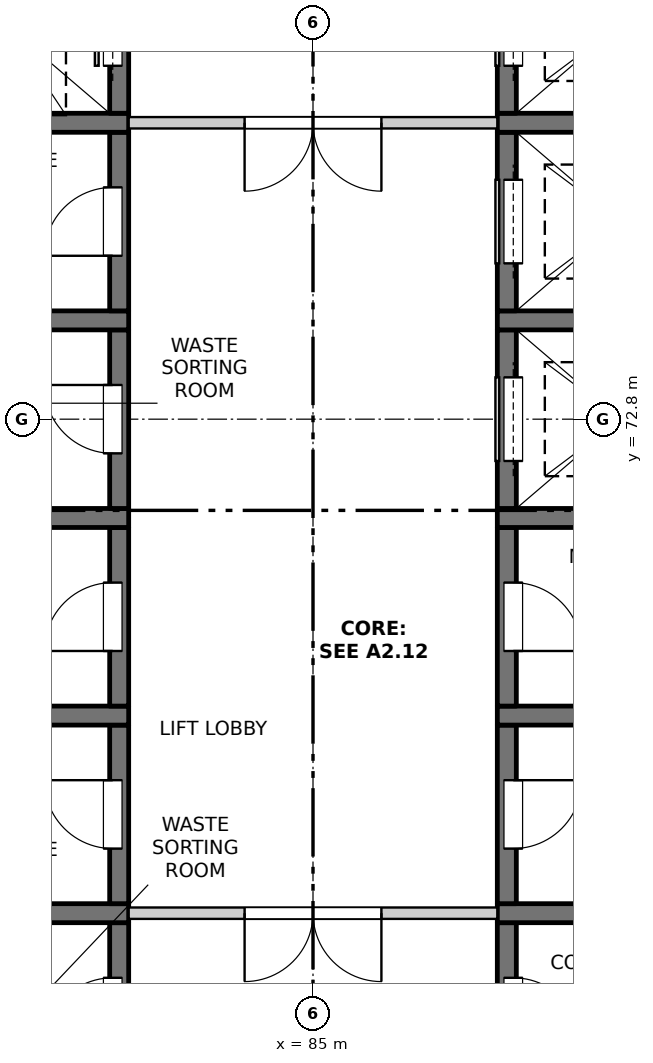
"""IFC4 building model, lengths in metres.
Left out: names, types, materials, properties, quantities, classifications, styles, units other than length and angle.
Written with IfcOpenShell. Run it as: python <this file> out.ifc"""

import sys

from ifc_helpers import new_model, si_unit, direction, frame, frame_2d, origin, place, context, subcontext, project, spatial, rectangle, extrude, element, fill, save


model = new_model("IFC4")
c1 = context("Model", 3, precision=1e-05, world=origin(), true_north=direction((0.0, 1.0)))
c2 = subcontext(c1, "Body", "Model", "MODEL_VIEW")
j1 = project(units=[si_unit("LENGTHUNIT", "METRE"), si_unit("PLANEANGLEUNIT", "RADIAN")], contexts=[c1])
p1 = place(None, origin())
s1 = spatial("IfcSite", under=j1, at=p1, CompositionType="ELEMENT")
p2 = place(p1, origin())
s2 = spatial("IfcBuilding", under=s1, at=p2, CompositionType="ELEMENT")
p3 = place(p2, frame((0.0, 0.0, 263.0)))
s3 = spatial("IfcBuildingStorey", under=s2, at=p3, CompositionType="ELEMENT", Elevation=263.0)
p4 = place(p3, frame((82.45, 63.825, -0.25), z_axis=(0.0, 0.0, 1.0), x_axis=(0.0, 1.0, 0.0)))
e1 = element("IfcWall", 1, at=p4, inside=s3, PredefinedType="SOLIDWALL", context=c2, shape_type="SweptSolid", body=[
    extrude(rectangle(XDim=2.35, YDim=0.25, at=frame_2d((1.175, 0.0))), origin(), (0.0, 0.0, 1.0), 3.35),
])
p5 = place(p4, frame((0.725, 0.0, 0.25)))
e2 = element("IfcOpeningElement", 2, at=p5, cuts=e1, PredefinedType="OPENING", context=c2, shape_type="SweptSolid", body=[
    extrude(rectangle(XDim=0.9, YDim=2.1, at=frame_2d((0.45, 1.05))), frame((0.0, 0.135, 0.0), z_axis=(0.0, -1.0, 0.0), x_axis=(1.0, 0.0, 0.0)), (0.0, 0.0, 1.0), 0.27),
])
p6 = place(p3, frame((79.575, 66.3, -0.25), z_axis=(0.0, 0.0, 1.0), x_axis=(1.0, 0.0, 0.0)))
e3 = element("IfcWall", 3, at=p6, inside=s3, PredefinedType="SOLIDWALL", context=c2, shape_type="SweptSolid", body=[
    extrude(rectangle(XDim=3.0, YDim=0.25, at=frame_2d((1.5, 0.0))), origin(), (0.0, 0.0, 1.0), 3.35),
])
p7 = place(p3, frame((82.45, 66.425, -0.25), z_axis=(0.0, 0.0, 1.0), x_axis=(0.0, 1.0, 0.0)))
e4 = element("IfcWall", 4, at=p7, inside=s3, PredefinedType="SOLIDWALL", context=c2, shape_type="SweptSolid", body=[
    extrude(rectangle(XDim=2.35, YDim=0.25, at=frame_2d((1.175, 0.0))), origin(), (0.0, 0.0, 1.0), 3.35),
])
p8 = place(p7, frame((0.725, 0.0, 0.25)))
e5 = element("IfcOpeningElement", 5, at=p8, cuts=e4, PredefinedType="OPENING", context=c2, shape_type="SweptSolid", body=[
    extrude(rectangle(XDim=0.9, YDim=2.1, at=frame_2d((0.45, 1.05))), frame((0.0, 0.135, 0.0), z_axis=(0.0, -1.0, 0.0), x_axis=(1.0, 0.0, 0.0)), (0.0, 0.0, 1.0), 0.27),
])
p9 = place(p3, frame((79.575, 68.9, -0.25), z_axis=(0.0, 0.0, 1.0), x_axis=(1.0, 0.0, 0.0)))
e6 = element("IfcWall", 6, at=p9, inside=s3, PredefinedType="SOLIDWALL", context=c2, shape_type="SweptSolid", body=[
    extrude(rectangle(XDim=3.0, YDim=0.25, at=frame_2d((1.5, 0.0))), origin(), (0.0, 0.0, 1.0), 3.35),
])
p10 = place(p3, frame((82.45, 69.025, -0.25), z_axis=(0.0, 0.0, 1.0), x_axis=(0.0, 1.0, 0.0)))
e7 = element("IfcWall", 7, at=p10, inside=s3, PredefinedType="SOLIDWALL", context=c2, shape_type="SweptSolid", body=[
    extrude(rectangle(XDim=2.35, YDim=0.25, at=frame_2d((1.175, 0.0))), origin(), (0.0, 0.0, 1.0), 3.35),
])
p11 = place(p10, frame((0.725, 0.0, 0.25)))
e8 = element("IfcOpeningElement", 8, at=p11, cuts=e7, PredefinedType="OPENING", context=c2, shape_type="SweptSolid", body=[
    extrude(rectangle(XDim=0.9, YDim=2.1, at=frame_2d((0.45, 1.05))), frame((0.0, 0.135, 0.0), z_axis=(0.0, -1.0, 0.0), x_axis=(1.0, 0.0, 0.0)), (0.0, 0.0, 1.0), 0.27),
])
p12 = place(p3, frame((79.575, 71.5, -0.25), z_axis=(0.0, 0.0, 1.0), x_axis=(1.0, 0.0, 0.0)))
e9 = element("IfcWall", 9, at=p12, inside=s3, PredefinedType="SOLIDWALL", context=c2, shape_type="SweptSolid", body=[
    extrude(rectangle(XDim=3.0, YDim=0.25, at=frame_2d((1.5, 0.0))), origin(), (0.0, 0.0, 1.0), 3.35),
])
p13 = place(p3, frame((82.45, 71.625, -0.25), z_axis=(0.0, 0.0, 1.0), x_axis=(0.0, 1.0, 0.0)))
e10 = element("IfcWall", 10, at=p13, inside=s3, PredefinedType="SOLIDWALL", context=c2, shape_type="SweptSolid", body=[
    extrude(rectangle(XDim=2.35, YDim=0.25, at=frame_2d((1.175, 0.0))), origin(), (0.0, 0.0, 1.0), 3.35),
])
p14 = place(p13, frame((0.725, 0.0, 0.25)))
e11 = element("IfcOpeningElement", 11, at=p14, cuts=e10, PredefinedType="OPENING", context=c2, shape_type="SweptSolid", body=[
    extrude(rectangle(XDim=0.9, YDim=2.1, at=frame_2d((0.45, 1.05))), frame((0.0, 0.135, 0.0), z_axis=(0.0, -1.0, 0.0), x_axis=(1.0, 0.0, 0.0)), (0.0, 0.0, 1.0), 0.27),
])
p15 = place(p3, frame((79.575, 74.1, -0.25), z_axis=(0.0, 0.0, 1.0), x_axis=(1.0, 0.0, 0.0)))
e12 = element("IfcWall", 12, at=p15, inside=s3, PredefinedType="SOLIDWALL", context=c2, shape_type="SweptSolid", body=[
    extrude(rectangle(XDim=3.0, YDim=0.25, at=frame_2d((1.5, 0.0))), origin(), (0.0, 0.0, 1.0), 3.35),
])
p16 = place(p3, frame((82.45, 74.225, -0.25), z_axis=(0.0, 0.0, 1.0), x_axis=(0.0, 1.0, 0.0)))
e13 = element("IfcWall", 13, at=p16, inside=s3, PredefinedType="SOLIDWALL", context=c2, shape_type="SweptSolid", body=[
    extrude(rectangle(XDim=2.35, YDim=0.25, at=frame_2d((1.175, 0.0))), origin(), (0.0, 0.0, 1.0), 3.35),
])
p17 = place(p16, frame((0.725, 0.0, 0.25)))
e14 = element("IfcOpeningElement", 14, at=p17, cuts=e13, PredefinedType="OPENING", context=c2, shape_type="SweptSolid", body=[
    extrude(rectangle(XDim=0.9, YDim=2.1, at=frame_2d((0.45, 1.05))), frame((0.0, 0.135, 0.0), z_axis=(0.0, -1.0, 0.0), x_axis=(1.0, 0.0, 0.0)), (0.0, 0.0, 1.0), 0.27),
])
p18 = place(p3, frame((79.575, 76.7, -0.25), z_axis=(0.0, 0.0, 1.0), x_axis=(1.0, 0.0, 0.0)))
e15 = element("IfcWall", 15, at=p18, inside=s3, PredefinedType="SOLIDWALL", context=c2, shape_type="SweptSolid", body=[
    extrude(rectangle(XDim=3.0, YDim=0.25, at=frame_2d((1.5, 0.0))), origin(), (0.0, 0.0, 1.0), 3.35),
])
p19 = place(p3, frame((82.45, 76.825, -0.25), z_axis=(0.0, 0.0, 1.0), x_axis=(0.0, 1.0, 0.0)))
e16 = element("IfcWall", 16, at=p19, inside=s3, PredefinedType="SOLIDWALL", context=c2, shape_type="SweptSolid", body=[
    extrude(rectangle(XDim=2.35, YDim=0.25, at=frame_2d((1.175, 0.0))), origin(), (0.0, 0.0, 1.0), 3.35),
])
p20 = place(p19, frame((0.625, 0.0, 0.25)))
e17 = element("IfcOpeningElement", 17, at=p20, cuts=e16, PredefinedType="OPENING", context=c2, shape_type="SweptSolid", body=[
    extrude(rectangle(XDim=1.1, YDim=2.1, at=frame_2d((0.55, 1.05))), frame((0.0, 0.135, 0.0), z_axis=(0.0, -1.0, 0.0), x_axis=(1.0, 0.0, 0.0)), (0.0, 0.0, 1.0), 0.27),
])
p21 = place(p3, frame((87.55, 63.825, -0.25), z_axis=(0.0, 0.0, 1.0), x_axis=(0.0, 1.0, 0.0)))
e18 = element("IfcWall", 18, at=p21, inside=s3, PredefinedType="SOLIDWALL", context=c2, shape_type="SweptSolid", body=[
    extrude(rectangle(XDim=2.35, YDim=0.25, at=frame_2d((1.175, 0.0))), origin(), (0.0, 0.0, 1.0), 3.35),
])
p22 = place(p21, frame((0.725, 0.0, 0.25)))
e19 = element("IfcOpeningElement", 19, at=p22, cuts=e18, PredefinedType="OPENING", context=c2, shape_type="SweptSolid", body=[
    extrude(rectangle(XDim=0.9, YDim=2.1, at=frame_2d((0.45, 1.05))), frame((0.0, 0.135, 0.0), z_axis=(0.0, -1.0, 0.0), x_axis=(1.0, 0.0, 0.0)), (0.0, 0.0, 1.0), 0.27),
])
p23 = place(p3, frame((87.425, 66.3, -0.25), z_axis=(0.0, 0.0, 1.0), x_axis=(1.0, 0.0, 0.0)))
e20 = element("IfcWall", 20, at=p23, inside=s3, PredefinedType="SOLIDWALL", context=c2, shape_type="SweptSolid", body=[
    extrude(rectangle(XDim=3.0, YDim=0.25, at=frame_2d((1.5, 0.0))), origin(), (0.0, 0.0, 1.0), 3.35),
])
p24 = place(p3, frame((87.55, 66.425, -0.25), z_axis=(0.0, 0.0, 1.0), x_axis=(0.0, 1.0, 0.0)))
e21 = element("IfcWall", 21, at=p24, inside=s3, PredefinedType="SOLIDWALL", context=c2, shape_type="SweptSolid", body=[
    extrude(rectangle(XDim=2.35, YDim=0.25, at=frame_2d((1.175, 0.0))), origin(), (0.0, 0.0, 1.0), 3.35),
])
p25 = place(p24, frame((0.725, 0.0, 0.25)))
e22 = element("IfcOpeningElement", 22, at=p25, cuts=e21, PredefinedType="OPENING", context=c2, shape_type="SweptSolid", body=[
    extrude(rectangle(XDim=0.9, YDim=2.1, at=frame_2d((0.45, 1.05))), frame((0.0, 0.135, 0.0), z_axis=(0.0, -1.0, 0.0), x_axis=(1.0, 0.0, 0.0)), (0.0, 0.0, 1.0), 0.27),
])
p26 = place(p3, frame((87.425, 68.9, -0.25), z_axis=(0.0, 0.0, 1.0), x_axis=(1.0, 0.0, 0.0)))
e23 = element("IfcWall", 23, at=p26, inside=s3, PredefinedType="SOLIDWALL", context=c2, shape_type="SweptSolid", body=[
    extrude(rectangle(XDim=3.0, YDim=0.25, at=frame_2d((1.5, 0.0))), origin(), (0.0, 0.0, 1.0), 3.35),
])
p27 = place(p3, frame((87.55, 69.025, -0.25), z_axis=(0.0, 0.0, 1.0), x_axis=(0.0, 1.0, 0.0)))
e24 = element("IfcWall", 24, at=p27, inside=s3, PredefinedType="SOLIDWALL", context=c2, shape_type="SweptSolid", body=[
    extrude(rectangle(XDim=2.35, YDim=0.25, at=frame_2d((1.175, 0.0))), origin(), (0.0, 0.0, 1.0), 3.35),
])
p28 = place(p27, frame((0.725, 0.0, 0.25)))
e25 = element("IfcOpeningElement", 25, at=p28, cuts=e24, PredefinedType="OPENING", context=c2, shape_type="SweptSolid", body=[
    extrude(rectangle(XDim=0.9, YDim=2.1, at=frame_2d((0.45, 1.05))), frame((0.0, 0.135, 0.0), z_axis=(0.0, -1.0, 0.0), x_axis=(1.0, 0.0, 0.0)), (0.0, 0.0, 1.0), 0.27),
])
p29 = place(p3, frame((87.425, 71.5, -0.25), z_axis=(0.0, 0.0, 1.0), x_axis=(1.0, 0.0, 0.0)))
e26 = element("IfcWall", 26, at=p29, inside=s3, PredefinedType="SOLIDWALL", context=c2, shape_type="SweptSolid", body=[
    extrude(rectangle(XDim=3.0, YDim=0.25, at=frame_2d((1.5, 0.0))), origin(), (0.0, 0.0, 1.0), 3.35),
])
p30 = place(p3, frame((87.55, 71.625, -0.25), z_axis=(0.0, 0.0, 1.0), x_axis=(0.0, 1.0, 0.0)))
e27 = element("IfcWall", 27, at=p30, inside=s3, PredefinedType="SOLIDWALL", context=c2, shape_type="SweptSolid", body=[
    extrude(rectangle(XDim=2.35, YDim=0.25, at=frame_2d((1.175, 0.0))), origin(), (0.0, 0.0, 1.0), 3.35),
])
p31 = place(p30, frame((0.625, 0.0, 0.25)))
e28 = element("IfcOpeningElement", 28, at=p31, cuts=e27, PredefinedType="OPENING", context=c2, shape_type="SweptSolid", body=[
    extrude(rectangle(XDim=1.1, YDim=2.1, at=frame_2d((0.55, 1.05))), frame((0.0, 0.135, 0.0), z_axis=(0.0, -1.0, 0.0), x_axis=(1.0, 0.0, 0.0)), (0.0, 0.0, 1.0), 0.27),
])
p32 = place(p3, frame((87.425, 74.1, -0.25), z_axis=(0.0, 0.0, 1.0), x_axis=(1.0, 0.0, 0.0)))
e29 = element("IfcWall", 29, at=p32, inside=s3, PredefinedType="SOLIDWALL", context=c2, shape_type="SweptSolid", body=[
    extrude(rectangle(XDim=3.0, YDim=0.25, at=frame_2d((1.5, 0.0))), origin(), (0.0, 0.0, 1.0), 3.35),
])
p33 = place(p3, frame((87.55, 74.225, -0.25), z_axis=(0.0, 0.0, 1.0), x_axis=(0.0, 1.0, 0.0)))
e30 = element("IfcWall", 30, at=p33, inside=s3, PredefinedType="SOLIDWALL", context=c2, shape_type="SweptSolid", body=[
    extrude(rectangle(XDim=2.35, YDim=0.25, at=frame_2d((1.175, 0.0))), origin(), (0.0, 0.0, 1.0), 3.35),
])
p34 = place(p33, frame((0.625, 0.0, 0.25)))
e31 = element("IfcOpeningElement", 31, at=p34, cuts=e30, PredefinedType="OPENING", context=c2, shape_type="SweptSolid", body=[
    extrude(rectangle(XDim=1.1, YDim=2.1, at=frame_2d((0.55, 1.05))), frame((0.0, 0.135, 0.0), z_axis=(0.0, -1.0, 0.0), x_axis=(1.0, 0.0, 0.0)), (0.0, 0.0, 1.0), 0.27),
])
p35 = place(p3, frame((87.425, 76.7, -0.25), z_axis=(0.0, 0.0, 1.0), x_axis=(1.0, 0.0, 0.0)))
e32 = element("IfcWall", 32, at=p35, inside=s3, PredefinedType="SOLIDWALL", context=c2, shape_type="SweptSolid", body=[
    extrude(rectangle(XDim=3.0, YDim=0.25, at=frame_2d((1.5, 0.0))), origin(), (0.0, 0.0, 1.0), 3.35),
])
p36 = place(p3, frame((87.55, 76.825, -0.25), z_axis=(0.0, 0.0, 1.0), x_axis=(0.0, 1.0, 0.0)))
e33 = element("IfcWall", 33, at=p36, inside=s3, PredefinedType="SOLIDWALL", context=c2, shape_type="SweptSolid", body=[
    extrude(rectangle(XDim=2.35, YDim=0.25, at=frame_2d((1.175, 0.0))), origin(), (0.0, 0.0, 1.0), 3.35),
])
p37 = place(p36, frame((0.625, 0.0, 0.25)))
e34 = element("IfcOpeningElement", 34, at=p37, cuts=e33, PredefinedType="OPENING", context=c2, shape_type="SweptSolid", body=[
    extrude(rectangle(XDim=1.1, YDim=2.1, at=frame_2d((0.55, 1.05))), frame((0.0, 0.135, 0.0), z_axis=(0.0, -1.0, 0.0), x_axis=(1.0, 0.0, 0.0)), (0.0, 0.0, 1.0), 0.27),
])
p38 = place(p3, frame((82.575, 66.3, 0.0), z_axis=(0.0, 0.0, 1.0), x_axis=(1.0, 0.0, 0.0)))
e35 = element("IfcWall", 35, at=p38, inside=s3, PredefinedType="PARTITIONING", context=c2, shape_type="SweptSolid", body=[
    extrude(rectangle(XDim=4.85, YDim=0.15, at=frame_2d((2.425, 0.0))), origin(), (0.0, 0.0, 1.0), 3.1),
])
p39 = place(p38, frame((1.525, 0.0, 0.0)))
e36 = element("IfcOpeningElement", 36, at=p39, cuts=e35, PredefinedType="OPENING", context=c2, shape_type="SweptSolid", body=[
    extrude(rectangle(XDim=1.8, YDim=2.1, at=frame_2d((0.9, 1.05))), frame((0.0, 0.085, 0.0), z_axis=(0.0, -1.0, 0.0), x_axis=(1.0, 0.0, 0.0)), (0.0, 0.0, 1.0), 0.17),
])
p40 = place(p3, frame((82.575, 76.7, 0.0), z_axis=(0.0, 0.0, 1.0), x_axis=(1.0, 0.0, 0.0)))
e37 = element("IfcWall", 37, at=p40, inside=s3, PredefinedType="PARTITIONING", context=c2, shape_type="SweptSolid", body=[
    extrude(rectangle(XDim=4.85, YDim=0.15, at=frame_2d((2.425, 0.0))), origin(), (0.0, 0.0, 1.0), 3.1),
])
p41 = place(p40, frame((1.525, 0.0, 0.0)))
e38 = element("IfcOpeningElement", 38, at=p41, cuts=e37, PredefinedType="OPENING", context=c2, shape_type="SweptSolid", body=[
    extrude(rectangle(XDim=1.8, YDim=2.1, at=frame_2d((0.9, 1.05))), frame((0.0, 0.085, 0.0), z_axis=(0.0, -1.0, 0.0), x_axis=(1.0, 0.0, 0.0)), (0.0, 0.0, 1.0), 0.17),
])
p42 = place(p5, origin())
e39 = element("IfcDoor", 39, at=p42, inside=s3, OperationType="SINGLE_SWING_LEFT", PredefinedType="DOOR", context=c2, shape_type="SweptSolid", body=[
    extrude(rectangle(XDim=0.9, YDim=2.1, at=frame_2d((0.45, 1.05))), frame((0.0, 0.11, 0.0), z_axis=(0.0, -1.0, 0.0), x_axis=(1.0, 0.0, 0.0)), (0.0, 0.0, 1.0), 0.05),
])
fill(e2, e39)
p43 = place(p22, origin())
e40 = element("IfcDoor", 40, at=p43, inside=s3, OperationType="SINGLE_SWING_RIGHT", PredefinedType="DOOR", context=c2, shape_type="SweptSolid", body=[
    extrude(rectangle(XDim=0.9, YDim=2.1, at=frame_2d((0.45, 1.05))), frame((0.0, -0.06, 0.0), z_axis=(0.0, -1.0, 0.0), x_axis=(1.0, 0.0, 0.0)), (0.0, 0.0, 1.0), 0.05),
])
fill(e19, e40)
p44 = place(p39, origin())
e41 = element("IfcDoor", 41, at=p44, inside=s3, OperationType="DOUBLE_DOOR_SINGLE_SWING", PredefinedType="DOOR", context=c2, shape_type="SweptSolid", body=[
    extrude(rectangle(XDim=1.8, YDim=2.1, at=frame_2d((0.9, 1.05))), frame((0.0, 0.025, 0.0), z_axis=(0.0, -1.0, 0.0), x_axis=(1.0, 0.0, 0.0)), (0.0, 0.0, 1.0), 0.05),
])
fill(e36, e41)
p45 = place(p8, origin())
e42 = element("IfcDoor", 42, at=p45, inside=s3, OperationType="SINGLE_SWING_RIGHT", PredefinedType="DOOR", context=c2, shape_type="SweptSolid", body=[
    extrude(rectangle(XDim=0.9, YDim=2.1, at=frame_2d((0.45, 1.05))), frame((0.0, 0.11, 0.0), z_axis=(0.0, -1.0, 0.0), x_axis=(1.0, 0.0, 0.0)), (0.0, 0.0, 1.0), 0.05),
])
fill(e5, e42)
p46 = place(p25, origin())
e43 = element("IfcDoor", 43, at=p46, inside=s3, OperationType="SINGLE_SWING_LEFT", PredefinedType="DOOR", context=c2, shape_type="SweptSolid", body=[
    extrude(rectangle(XDim=0.9, YDim=2.1, at=frame_2d((0.45, 1.05))), frame((0.0, -0.06, 0.0), z_axis=(0.0, -1.0, 0.0), x_axis=(1.0, 0.0, 0.0)), (0.0, 0.0, 1.0), 0.05),
])
fill(e22, e43)
p47 = place(p11, origin())
e44 = element("IfcDoor", 44, at=p47, inside=s3, OperationType="SINGLE_SWING_LEFT", PredefinedType="DOOR", context=c2, shape_type="SweptSolid", body=[
    extrude(rectangle(XDim=0.9, YDim=2.1, at=frame_2d((0.45, 1.05))), frame((0.0, 0.11, 0.0), z_axis=(0.0, -1.0, 0.0), x_axis=(1.0, 0.0, 0.0)), (0.0, 0.0, 1.0), 0.05),
])
fill(e8, e44)
p48 = place(p28, origin())
e45 = element("IfcDoor", 45, at=p48, inside=s3, OperationType="SINGLE_SWING_RIGHT", PredefinedType="DOOR", context=c2, shape_type="SweptSolid", body=[
    extrude(rectangle(XDim=0.9, YDim=2.1, at=frame_2d((0.45, 1.05))), frame((0.0, -0.06, 0.0), z_axis=(0.0, -1.0, 0.0), x_axis=(1.0, 0.0, 0.0)), (0.0, 0.0, 1.0), 0.05),
])
fill(e25, e45)
p49 = place(p14, origin())
e46 = element("IfcDoor", 46, at=p49, inside=s3, OperationType="SINGLE_SWING_RIGHT", PredefinedType="DOOR", context=c2, shape_type="SweptSolid", body=[
    extrude(rectangle(XDim=0.9, YDim=2.1, at=frame_2d((0.45, 1.05))), frame((0.0, 0.11, 0.0), z_axis=(0.0, -1.0, 0.0), x_axis=(1.0, 0.0, 0.0)), (0.0, 0.0, 1.0), 0.05),
])
fill(e11, e46)
p50 = place(p31, origin())
e47 = element("IfcDoor", 47, at=p50, inside=s3, OperationType="SLIDING_TO_LEFT", PredefinedType="DOOR", context=c2, shape_type="SweptSolid", body=[
    extrude(rectangle(XDim=1.1, YDim=2.1, at=frame_2d((0.55, 1.05))), frame((0.0, -0.06, 0.0), z_axis=(0.0, -1.0, 0.0), x_axis=(1.0, 0.0, 0.0)), (0.0, 0.0, 1.0), 0.05),
])
fill(e28, e47)
p51 = place(p17, origin())
e48 = element("IfcDoor", 48, at=p51, inside=s3, OperationType="SINGLE_SWING_LEFT", PredefinedType="DOOR", context=c2, shape_type="SweptSolid", body=[
    extrude(rectangle(XDim=0.9, YDim=2.1, at=frame_2d((0.45, 1.05))), frame((0.0, 0.11, 0.0), z_axis=(0.0, -1.0, 0.0), x_axis=(1.0, 0.0, 0.0)), (0.0, 0.0, 1.0), 0.05),
])
fill(e14, e48)
p52 = place(p34, origin())
e49 = element("IfcDoor", 49, at=p52, inside=s3, OperationType="SLIDING_TO_LEFT", PredefinedType="DOOR", context=c2, shape_type="SweptSolid", body=[
    extrude(rectangle(XDim=1.1, YDim=2.1, at=frame_2d((0.55, 1.05))), frame((0.0, -0.06, 0.0), z_axis=(0.0, -1.0, 0.0), x_axis=(1.0, 0.0, 0.0)), (0.0, 0.0, 1.0), 0.05),
])
fill(e31, e49)
p53 = place(p41, origin())
e50 = element("IfcDoor", 50, at=p53, inside=s3, OperationType="DOUBLE_DOOR_SINGLE_SWING", PredefinedType="DOOR", context=c2, shape_type="SweptSolid", body=[
    extrude(rectangle(XDim=1.8, YDim=2.1, at=frame_2d((0.9, 1.05))), frame((0.0, 0.025, 0.0), z_axis=(0.0, -1.0, 0.0), x_axis=(1.0, 0.0, 0.0)), (0.0, 0.0, 1.0), 0.05),
])
fill(e38, e50)
p54 = place(p20, origin())
e51 = element("IfcDoor", 51, at=p54, inside=s3, OperationType="SLIDING_TO_LEFT", PredefinedType="DOOR", context=c2, shape_type="SweptSolid", body=[
    extrude(rectangle(XDim=1.1, YDim=2.1, at=frame_2d((0.55, 1.05))), frame((0.0, 0.11, 0.0), z_axis=(0.0, -1.0, 0.0), x_axis=(1.0, 0.0, 0.0)), (0.0, 0.0, 1.0), 0.05),
])
fill(e17, e51)
p55 = place(p37, origin())
e52 = element("IfcDoor", 52, at=p55, inside=s3, OperationType="SLIDING_TO_LEFT", PredefinedType="DOOR", context=c2, shape_type="SweptSolid", body=[
    extrude(rectangle(XDim=1.1, YDim=2.1, at=frame_2d((0.55, 1.05))), frame((0.0, -0.06, 0.0), z_axis=(0.0, -1.0, 0.0), x_axis=(1.0, 0.0, 0.0)), (0.0, 0.0, 1.0), 0.05),
])
fill(e34, e52)
save(model, sys.argv[1])
